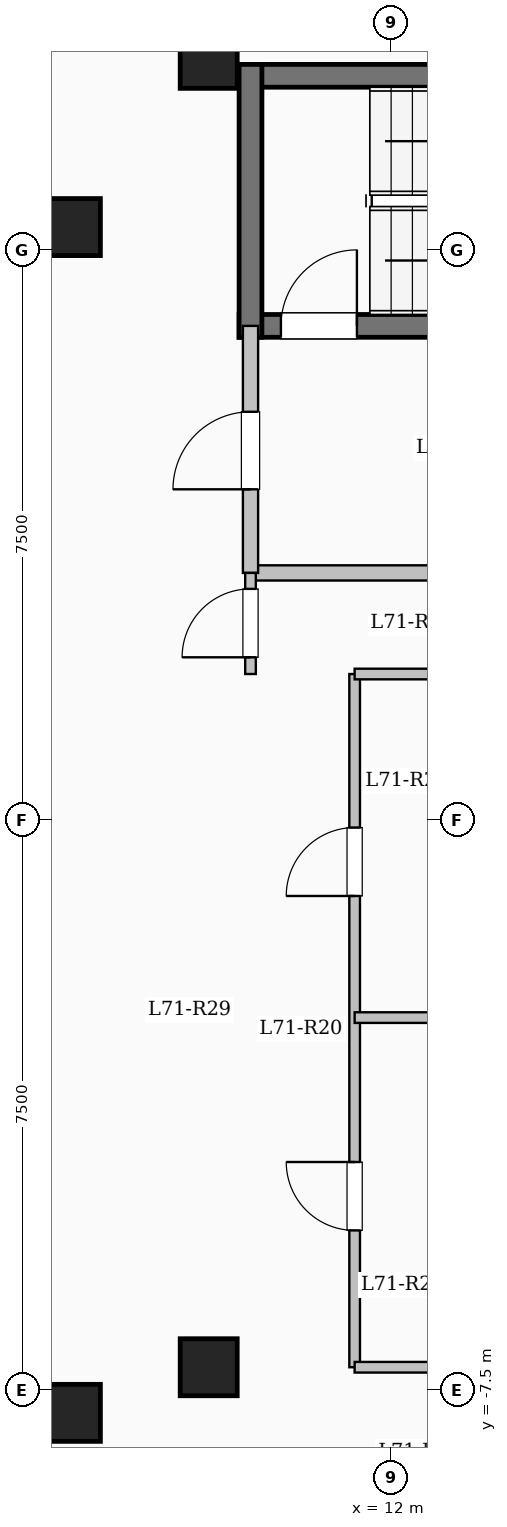
"""IFC4 building model, lengths in metres.
Left out: names, types, materials, properties, quantities, classifications, styles, units other than length and angle.
Written with IfcOpenShell. Run it as: python <this file> out.ifc"""

import sys

from ifc_helpers import new_model, si_unit, direction, frame, frame_2d, origin, origin_2d, place, context, subcontext, project, spatial, rectangle, extrude, element, fill, save


model = new_model("IFC4")
c1 = context("Model", 3, precision=1e-05, world=origin(), true_north=direction((0.0, 1.0)))
c2 = subcontext(c1, "Body", "Model", "MODEL_VIEW")
j1 = project(units=[si_unit("LENGTHUNIT", "METRE"), si_unit("PLANEANGLEUNIT", "RADIAN")], contexts=[c1])
p1 = place(None, origin())
s1 = spatial("IfcSite", under=j1, at=p1, CompositionType="ELEMENT")
p2 = place(p1, origin())
s2 = spatial("IfcBuilding", under=s1, at=p2, CompositionType="ELEMENT")
p3 = place(p2, frame((0.0, 0.0, 261.6)))
s3 = spatial("IfcBuildingStorey", under=s2, at=p3, CompositionType="ELEMENT", Elevation=261.6)
for number, where, z_axis, x_axis in (
    (1, (7.8, -7.8, 0.0), (0.0, 0.0, 1.0), (1.0, 0.0, 0.0)),
    (2, (7.8, 7.8, 0.0), (0.0, 0.0, 1.0), (1.0, 0.0, 0.0)),
    (3, (9.6, -7.2, 0.0), (0.0, 0.0, 1.0), (1.0, 0.0, 0.0)),
    (4, (9.6, 10.0, 0.0), (0.0, 0.0, 1.0), (1.0, 0.0, 0.0)),
):
    element("IfcColumn", number, at=place(p3, frame(where, z_axis=z_axis, x_axis=x_axis)), inside=s3, PredefinedType="COLUMN", context=c2, shape_type="SweptSolid", body=[
        extrude(rectangle(XDim=0.75, YDim=0.75, at=origin_2d()), origin(), (0.0, 0.0, 1.0), 3.35),
    ])
p4 = place(p3, frame((10.0, 9.79, 0.0), z_axis=(0.0, 0.0, 1.0), x_axis=(1.0, 0.0, 0.0)))
e5 = element("IfcWall", 5, at=p4, inside=s3, PredefinedType="SHEAR", context=c2, shape_type="SweptSolid", body=[
    extrude(rectangle(XDim=8.0, YDim=0.3, at=frame_2d((4.0, 0.0))), origin(), (0.0, 0.0, 1.0), 3.35),
])
p5 = place(p3, frame((10.0, 6.5, 0.0), z_axis=(0.0, 0.0, 1.0), x_axis=(1.0, 0.0, 0.0)))
e6 = element("IfcWall", 6, at=p5, inside=s3, PredefinedType="SHEAR", context=c2, shape_type="SweptSolid", body=[
    extrude(rectangle(XDim=8.0, YDim=0.3, at=frame_2d((4.0, 0.0))), origin(), (0.0, 0.0, 1.0), 3.35),
])
p6 = place(p5, frame((0.55, 0.0, 0.0)))
e7 = element("IfcOpeningElement", 7, at=p6, cuts=e6, PredefinedType="OPENING", context=c2, shape_type="SweptSolid", body=[
    extrude(rectangle(XDim=1.0, YDim=2.15, at=frame_2d((0.5, 1.075))), frame((0.0, 0.16, 0.0), z_axis=(0.0, -1.0, 0.0), x_axis=(1.0, 0.0, 0.0)), (0.0, 0.0, 1.0), 0.32),
])
p7 = place(p3, frame((10.15, 6.35, 0.0), z_axis=(0.0, 0.0, 1.0), x_axis=(0.0, 1.0, 0.0)))
e8 = element("IfcWall", 8, at=p7, inside=s3, PredefinedType="SHEAR", context=c2, shape_type="SweptSolid", body=[
    extrude(rectangle(XDim=3.59, YDim=0.3, at=frame_2d((1.795, 0.0))), origin(), (0.0, 0.0, 1.0), 3.35),
])
p8 = place(p3, frame((10.15, 3.25, 0.0), z_axis=(0.0, 0.0, 1.0), x_axis=(1.0, 0.0, 0.0)))
e9 = element("IfcWall", 9, at=p8, inside=s3, PredefinedType="SOLIDWALL", context=c2, shape_type="SweptSolid", body=[
    extrude(rectangle(XDim=5.4, YDim=0.2, at=frame_2d((2.7, 0.0))), origin(), (0.0, 0.0, 1.0), 3.1),
])
p9 = place(p3, frame((10.15, 3.25, 0.0), z_axis=(0.0, 0.0, 1.0), x_axis=(0.0, 1.0, 0.0)))
e10 = element("IfcWall", 10, at=p9, inside=s3, PredefinedType="SOLIDWALL", context=c2, shape_type="SweptSolid", body=[
    extrude(rectangle(XDim=3.25, YDim=0.2, at=frame_2d((1.625, 0.0))), origin(), (0.0, 0.0, 1.0), 3.1),
])
p10 = place(p9, frame((1.1, 0.0, 0.0)))
e11 = element("IfcOpeningElement", 11, at=p10, cuts=e10, PredefinedType="OPENING", context=c2, shape_type="SweptSolid", body=[
    extrude(rectangle(XDim=1.02, YDim=2.15, at=frame_2d((0.51, 1.075))), frame((0.0, 0.11, 0.0), z_axis=(0.0, -1.0, 0.0), x_axis=(1.0, 0.0, 0.0)), (0.0, 0.0, 1.0), 0.22),
])
p11 = place(p3, frame((10.15, 1.92, 0.0), z_axis=(0.0, 0.0, 1.0), x_axis=(0.0, 1.0, 0.0)))
e12 = element("IfcWall", 12, at=p11, inside=s3, PredefinedType="PARTITIONING", context=c2, shape_type="SweptSolid", body=[
    extrude(rectangle(XDim=1.33, YDim=0.14, at=frame_2d((0.665, 0.0))), origin(), (0.0, 0.0, 1.0), 3.1),
])
p12 = place(p11, frame((0.22, 0.0, 0.0)))
e13 = element("IfcOpeningElement", 13, at=p12, cuts=e12, PredefinedType="OPENING", context=c2, shape_type="SweptSolid", body=[
    extrude(rectangle(XDim=0.9, YDim=2.08, at=frame_2d((0.45, 1.04))), frame((0.0, 0.08, 0.0), z_axis=(0.0, -1.0, 0.0), x_axis=(1.0, 0.0, 0.0)), (0.0, 0.0, 1.0), 0.16),
])
p13 = place(p3, frame((11.52, -7.2, 0.0), z_axis=(0.0, 0.0, 1.0), x_axis=(0.0, 1.0, 0.0)))
e14 = element("IfcWall", 14, at=p13, inside=s3, PredefinedType="PARTITIONING", context=c2, shape_type="SweptSolid", body=[
    extrude(rectangle(XDim=9.12, YDim=0.14, at=frame_2d((4.56, 0.0))), origin(), (0.0, 0.0, 1.0), 3.1),
])
p14 = place(p13, frame((1.8, 0.0, 0.0)))
e15 = element("IfcOpeningElement", 15, at=p14, cuts=e14, PredefinedType="OPENING", context=c2, shape_type="SweptSolid", body=[
    extrude(rectangle(XDim=0.9, YDim=2.08, at=frame_2d((0.45, 1.04))), frame((0.0, 0.08, 0.0), z_axis=(0.0, -1.0, 0.0), x_axis=(1.0, 0.0, 0.0)), (0.0, 0.0, 1.0), 0.16),
])
p15 = place(p13, frame((6.2, 0.0, 0.0)))
e16 = element("IfcOpeningElement", 16, at=p15, cuts=e14, PredefinedType="OPENING", context=c2, shape_type="SweptSolid", body=[
    extrude(rectangle(XDim=0.9, YDim=2.08, at=frame_2d((0.45, 1.04))), frame((0.0, 0.08, 0.0), z_axis=(0.0, -1.0, 0.0), x_axis=(1.0, 0.0, 0.0)), (0.0, 0.0, 1.0), 0.16),
])
p16 = place(p3, frame((11.52, 1.92, 0.0), z_axis=(0.0, 0.0, 1.0), x_axis=(1.0, 0.0, 0.0)))
e17 = element("IfcWall", 17, at=p16, inside=s3, PredefinedType="PARTITIONING", context=c2, shape_type="SweptSolid", body=[
    extrude(rectangle(XDim=1.33, YDim=0.14, at=frame_2d((0.665, 0.0))), origin(), (0.0, 0.0, 1.0), 3.1),
])
p17 = place(p3, frame((11.52, -7.2, 0.0), z_axis=(0.0, 0.0, 1.0), x_axis=(1.0, 0.0, 0.0)))
e18 = element("IfcWall", 18, at=p17, inside=s3, PredefinedType="PARTITIONING", context=c2, shape_type="SweptSolid", body=[
    extrude(rectangle(XDim=1.33, YDim=0.14, at=frame_2d((0.665, 0.0))), origin(), (0.0, 0.0, 1.0), 2.235),
])
p18 = place(p3, frame((11.52, -2.6, 0.0), z_axis=(0.0, 0.0, 1.0), x_axis=(1.0, 0.0, 0.0)))
e19 = element("IfcWall", 19, at=p18, inside=s3, PredefinedType="PARTITIONING", context=c2, shape_type="SweptSolid", body=[
    extrude(rectangle(XDim=1.33, YDim=0.14, at=frame_2d((0.665, 0.0))), origin(), (0.0, 0.0, 1.0), 3.1),
])
p19 = place(p6, origin())
e20 = element("IfcDoor", 20, at=p19, inside=s3, OperationType="SINGLE_SWING_RIGHT", PredefinedType="DOOR", context=c2, shape_type="SweptSolid", body=[
    extrude(rectangle(XDim=1.0, YDim=2.15, at=frame_2d((0.5, 1.075))), frame((0.0, 0.025, 0.0), z_axis=(0.0, -1.0, 0.0), x_axis=(1.0, 0.0, 0.0)), (0.0, 0.0, 1.0), 0.05),
])
fill(e7, e20)
p20 = place(p10, origin())
e21 = element("IfcDoor", 21, at=p20, inside=s3, OperationType="SINGLE_SWING_LEFT", PredefinedType="DOOR", context=c2, shape_type="SweptSolid", body=[
    extrude(rectangle(XDim=1.02, YDim=2.15, at=frame_2d((0.51, 1.075))), frame((0.0, 0.025, 0.0), z_axis=(0.0, -1.0, 0.0), x_axis=(1.0, 0.0, 0.0)), (0.0, 0.0, 1.0), 0.05),
])
fill(e11, e21)
p21 = place(p12, origin())
e22 = element("IfcDoor", 22, at=p21, inside=s3, OperationType="SINGLE_SWING_LEFT", PredefinedType="DOOR", context=c2, shape_type="SweptSolid", body=[
    extrude(rectangle(XDim=0.9, YDim=2.08, at=frame_2d((0.45, 1.04))), frame((0.0, 0.025, 0.0), z_axis=(0.0, -1.0, 0.0), x_axis=(1.0, 0.0, 0.0)), (0.0, 0.0, 1.0), 0.05),
])
fill(e13, e22)
p22 = place(p14, origin())
e23 = element("IfcDoor", 23, at=p22, inside=s3, OperationType="SINGLE_SWING_RIGHT", PredefinedType="DOOR", context=c2, shape_type="SweptSolid", body=[
    extrude(rectangle(XDim=0.9, YDim=2.08, at=frame_2d((0.45, 1.04))), frame((0.0, 0.025, 0.0), z_axis=(0.0, -1.0, 0.0), x_axis=(1.0, 0.0, 0.0)), (0.0, 0.0, 1.0), 0.05),
])
fill(e15, e23)
p23 = place(p15, origin())
e24 = element("IfcDoor", 24, at=p23, inside=s3, OperationType="SINGLE_SWING_LEFT", PredefinedType="DOOR", context=c2, shape_type="SweptSolid", body=[
    extrude(rectangle(XDim=0.9, YDim=2.08, at=frame_2d((0.45, 1.04))), frame((0.0, 0.025, 0.0), z_axis=(0.0, -1.0, 0.0), x_axis=(1.0, 0.0, 0.0)), (0.0, 0.0, 1.0), 0.05),
])
fill(e16, e24)
save(model, sys.argv[1])
